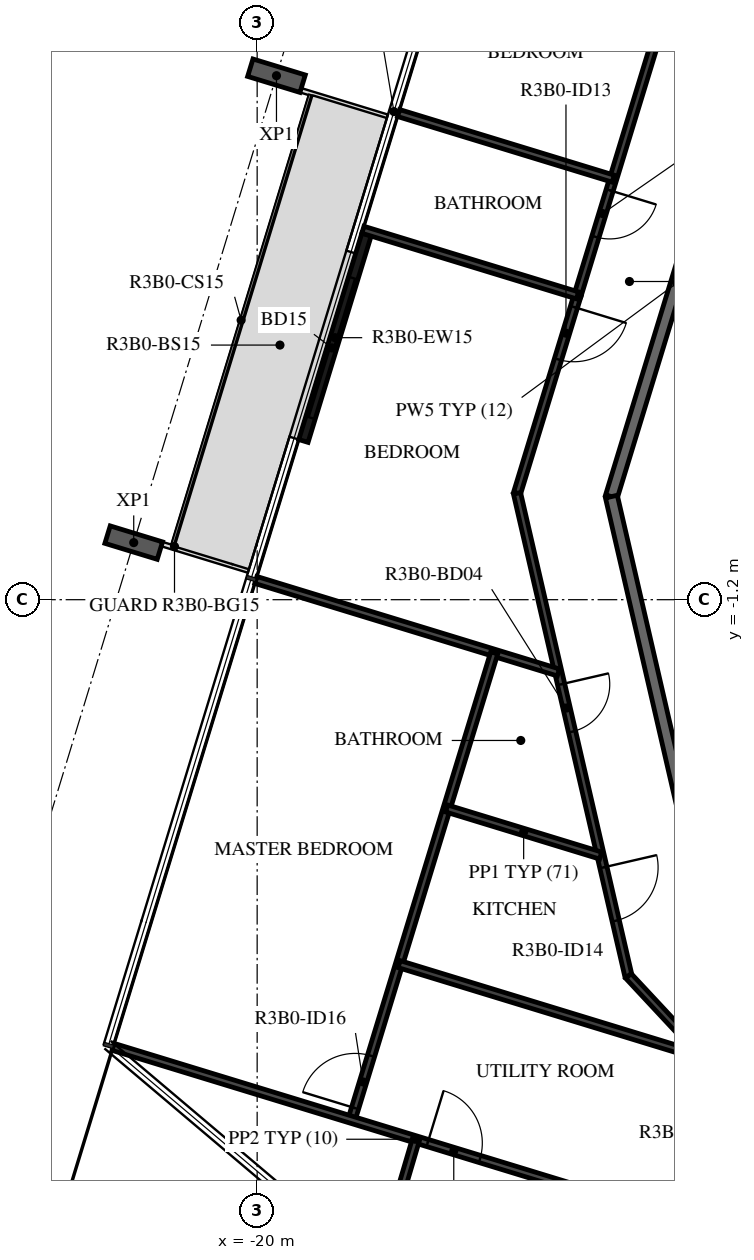
"""IFC4 building model, lengths in metres.
Left out: names, types, materials, properties, quantities, classifications, styles, units other than length and angle.
Written with IfcOpenShell. Run it as: python <this file> out.ifc"""

import sys

from ifc_helpers import new_model, si_unit, direction, frame, frame_2d, origin, origin_2d, place, context, subcontext, project, spatial, rectangle, i_section, extrude, element, fill, save


model = new_model("IFC4")
c1 = context("Model", 3, precision=1e-05, world=origin(), true_north=direction((0.0, 1.0)))
c2 = subcontext(c1, "Body", "Model", "MODEL_VIEW")
j1 = project(units=[si_unit("LENGTHUNIT", "METRE"), si_unit("PLANEANGLEUNIT", "RADIAN")], contexts=[c1])
p1 = place(None, origin())
s1 = spatial("IfcSite", under=j1, at=p1, CompositionType="ELEMENT")
p2 = place(p1, origin())
s2 = spatial("IfcBuilding", under=s1, at=p2, CompositionType="ELEMENT")
p3 = place(p2, frame((0.0, 0.0, 127.4)))
s3 = spatial("IfcBuildingStorey", under=s2, at=p3, CompositionType="ELEMENT", Elevation=127.4)
for number, where, z_axis, x_axis in (
    (1, (-19.682, 7.417, -0.38), (0.0, 0.0, 1.0), (0.292, 0.956, 0.0)),
    (2, (-22.03, -0.261, -0.38), (0.0, 0.0, 1.0), (0.292, 0.956, 0.0)),
):
    element("IfcColumn", number, at=place(p3, frame(where, z_axis=z_axis, x_axis=x_axis)), inside=s3, PredefinedType="COLUMN", context=c2, shape_type="SweptSolid", body=[
        extrude(i_section(OverallWidth=0.3, OverallDepth=0.9, WebThickness=0.019, FlangeThickness=0.035, FilletRadius=0.03, at=origin_2d()), origin(), (0.0, 0.0, 1.0), 3.5),
    ])
p4 = place(p3, frame((-18.201, 4.807, 0.0), z_axis=(0.0, 0.0, 1.0), x_axis=(-0.292356467713, -0.956309414252, 0.0)))
e3 = element("IfcWall", 3, at=p4, inside=s3, PredefinedType="STANDARD", context=c2, shape_type="SweptSolid", body=[
    extrude(rectangle(XDim=3.552, YDim=0.16, at=frame_2d((1.776, 0.0))), origin(), (0.0, 0.0, 1.0), 3.12),
])
p5 = place(p4, frame((0.752, 0.0, 0.0)))
e4 = element("IfcOpeningElement", 4, at=p5, cuts=e3, PredefinedType="OPENING", context=c2, shape_type="SweptSolid", body=[
    extrude(rectangle(XDim=2.4, YDim=2.4, at=frame_2d((1.2, 1.2))), frame((0.0, 0.09, 0.0), z_axis=(0.0, -1.0, 0.0), x_axis=(1.0, 0.0, 0.0)), (0.0, 0.0, 1.0), 0.18),
])
p6 = place(p3, frame((-12.028, 7.516, 0.0), z_axis=(0.0, 0.0, 1.0), x_axis=(-0.292365533182, -0.956306642771, 0.0)))
e5 = element("IfcWall", 5, at=p6, inside=s3, PredefinedType="STANDARD", context=c2, shape_type="SweptSolid", body=[
    extrude(rectangle(XDim=7.342, YDim=0.2, at=frame_2d((3.671, 0.0))), origin(), (0.0, 0.0, 1.0), 3.12),
])
p7 = place(p3, frame((-14.175, 0.495, 0.0), z_axis=(0.0, 0.0, 1.0), x_axis=(0.224922649383, -0.974376622151, 0.0)))
e6 = element("IfcWall", 6, at=p7, inside=s3, PredefinedType="STANDARD", context=c2, shape_type="SweptSolid", body=[
    extrude(rectangle(XDim=7.342, YDim=0.2, at=frame_2d((3.671, 0.0))), origin(), (0.0, 0.0, 1.0), 3.12),
])
p8 = place(p3, frame((-14.479, -13.504, 0.0), z_axis=(0.0, 0.0, 1.0), x_axis=(0.731329393611, 0.682024426278, 0.0)))
e7 = element("IfcWall", 7, at=p8, inside=s3, PredefinedType="STANDARD", context=c2, shape_type="SweptSolid", body=[
    extrude(rectangle(XDim=5.892, YDim=0.2, at=frame_2d((2.946, 0.0))), origin(), (0.0, 0.0, 1.0), 3.12),
])
p9 = place(p3, frame((-13.345, 8.339, 0.0), z_axis=(0.0, 0.0, 1.0), x_axis=(-0.292341490839, -0.956313992752, 0.0)))
e8 = element("IfcWall", 8, at=p9, inside=s3, PredefinedType="PARTITIONING", context=c2, shape_type="SweptSolid", body=[
    extrude(rectangle(XDim=4.742, YDim=0.12, at=frame_2d((2.371, 0.0))), origin(), (0.0, 0.0, 1.0), 3.12),
])
p10 = place(p9, frame((2.935, 0.0, 0.0)))
e9 = element("IfcOpeningElement", 9, at=p10, cuts=e8, PredefinedType="OPENING", context=c2, shape_type="SweptSolid", body=[
    extrude(rectangle(XDim=0.8, YDim=2.1, at=frame_2d((0.4, 1.05))), frame((0.0, 0.07, 0.0), z_axis=(0.0, -1.0, 0.0), x_axis=(1.0, 0.0, 0.0)), (0.0, 0.0, 1.0), 0.14),
])
p11 = place(p3, frame((-14.731, 3.804, 0.0), z_axis=(0.0, 0.0, 1.0), x_axis=(-0.292371609919, -0.956304784947, 0.0)))
e10 = element("IfcWall", 10, at=p11, inside=s3, PredefinedType="PARTITIONING", context=c2, shape_type="SweptSolid", body=[
    extrude(rectangle(XDim=3.404, YDim=0.12, at=frame_2d((1.702, 0.0))), origin(), (0.0, 0.0, 1.0), 3.12),
])
p12 = place(p11, frame((0.2, 0.0, 0.0)))
e11 = element("IfcOpeningElement", 11, at=p12, cuts=e10, PredefinedType="OPENING", context=c2, shape_type="SweptSolid", body=[
    extrude(rectangle(XDim=0.9, YDim=2.1, at=frame_2d((0.45, 1.05))), frame((0.0, 0.07, 0.0), z_axis=(0.0, -1.0, 0.0), x_axis=(1.0, 0.0, 0.0)), (0.0, 0.0, 1.0), 0.14),
])
p13 = place(p3, frame((-15.727, 0.549, 0.0), z_axis=(0.0, 0.0, 1.0), x_axis=(0.22493611855, -0.974373512864, 0.0)))
e12 = element("IfcWall", 12, at=p13, inside=s3, PredefinedType="PARTITIONING", context=c2, shape_type="SweptSolid", body=[
    extrude(rectangle(XDim=8.146, YDim=0.12, at=frame_2d((4.073, 0.0))), origin(), (0.0, 0.0, 1.0), 3.12),
])
p14 = place(p13, frame((3.223, 0.0, 0.0)))
e13 = element("IfcOpeningElement", 13, at=p14, cuts=e12, PredefinedType="OPENING", context=c2, shape_type="SweptSolid", body=[
    extrude(rectangle(XDim=0.8, YDim=2.1, at=frame_2d((0.4, 1.05))), frame((0.0, 0.07, 0.0), z_axis=(0.0, -1.0, 0.0), x_axis=(1.0, 0.0, 0.0)), (0.0, 0.0, 1.0), 0.14),
])
p15 = place(p13, frame((6.314, 0.0, 0.0)))
e14 = element("IfcOpeningElement", 14, at=p15, cuts=e12, PredefinedType="OPENING", context=c2, shape_type="SweptSolid", body=[
    extrude(rectangle(XDim=0.9, YDim=2.1, at=frame_2d((0.45, 1.05))), frame((0.0, 0.07, 0.0), z_axis=(0.0, -1.0, 0.0), x_axis=(1.0, 0.0, 0.0)), (0.0, 0.0, 1.0), 0.14),
])
p16 = place(p3, frame((-13.894, -7.388, 0.0), z_axis=(0.0, 0.0, 1.0), x_axis=(0.681978591143, -0.731372135935, 0.0)))
e15 = element("IfcWall", 15, at=p16, inside=s3, PredefinedType="PARTITIONING", context=c2, shape_type="SweptSolid", body=[
    extrude(rectangle(XDim=4.073, YDim=0.12, at=frame_2d((2.036, 0.0))), origin(), (0.0, 0.0, 1.0), 3.12),
])
p17 = place(p16, frame((2.033, 0.0, 0.0)))
e16 = element("IfcOpeningElement", 16, at=p17, cuts=e15, PredefinedType="OPENING", context=c2, shape_type="SweptSolid", body=[
    extrude(rectangle(XDim=0.9, YDim=2.1, at=frame_2d((0.45, 1.05))), frame((0.0, 0.07, 0.0), z_axis=(0.0, -1.0, 0.0), x_axis=(1.0, 0.0, 0.0)), (0.0, 0.0, 1.0), 0.14),
])
p18 = place(p3, frame((-17.674, 6.803, 0.0), z_axis=(0.0, 0.0, 1.0), x_axis=(0.956309456779, -0.292356328604, 0.0)))
e17 = element("IfcWall", 17, at=p18, inside=s3, PredefinedType="PARTITIONING", context=c2, shape_type="SweptSolid", body=[
    extrude(rectangle(XDim=3.691, YDim=0.12, at=frame_2d((1.846, 0.0))), origin(), (0.0, 0.0, 1.0), 2.73),
])
p19 = place(p3, frame((-14.731, 3.804, 0.0), z_axis=(0.0, 0.0, 1.0), x_axis=(-0.956303802771, 0.292374822456, 0.0)))
e18 = element("IfcWall", 18, at=p19, inside=s3, PredefinedType="PARTITIONING", context=c2, shape_type="SweptSolid", body=[
    extrude(rectangle(XDim=3.691, YDim=0.12, at=frame_2d((1.845, 0.0))), origin(), (0.0, 0.0, 1.0), 3.12),
])
p20 = place(p3, frame((-20.022, -0.875, 0.0), z_axis=(0.0, 0.0, 1.0), x_axis=(0.956311126457, -0.292350866963, 0.0)))
e19 = element("IfcWall", 19, at=p20, inside=s3, PredefinedType="PARTITIONING", context=c2, shape_type="SweptSolid", body=[
    extrude(rectangle(XDim=5.203, YDim=0.12, at=frame_2d((2.601, 0.0))), origin(), (0.0, 0.0, 1.0), 2.73),
])
p21 = place(p3, frame((-18.448, -9.752, 0.0), z_axis=(0.0, 0.0, 1.0), x_axis=(0.292365310779, 0.956306710764, 0.0)))
e20 = element("IfcWall", 20, at=p21, inside=s3, PredefinedType="PARTITIONING", context=c2, shape_type="SweptSolid", body=[
    extrude(rectangle(XDim=8.029, YDim=0.12, at=frame_2d((4.015, 0.0))), origin(), (0.0, 0.0, 1.0), 3.12),
])
p22 = place(p21, frame((0.2, 0.0, 0.0)))
e21 = element("IfcOpeningElement", 21, at=p22, cuts=e20, PredefinedType="OPENING", context=c2, shape_type="SweptSolid", body=[
    extrude(rectangle(XDim=0.9, YDim=2.1, at=frame_2d((0.45, 1.05))), frame((0.0, 0.07, 0.0), z_axis=(0.0, -1.0, 0.0), x_axis=(1.0, 0.0, 0.0)), (0.0, 0.0, 1.0), 0.14),
])
p23 = place(p3, frame((-22.369, -8.554, 0.0), z_axis=(0.0, 0.0, 1.0), x_axis=(0.956298667533, -0.292391618339, 0.0)))
e22 = element("IfcWall", 22, at=p23, inside=s3, PredefinedType="PARTITIONING", context=c2, shape_type="SweptSolid", body=[
    extrude(rectangle(XDim=10.392, YDim=0.12, at=frame_2d((5.196, 0.0))), origin(), (0.0, 0.0, 1.0), 2.73),
])
p24 = place(p23, frame((5.408, 0.0, 0.0)))
e23 = element("IfcOpeningElement", 23, at=p24, cuts=e22, PredefinedType="OPENING", context=c2, shape_type="SweptSolid", body=[
    extrude(rectangle(XDim=0.9, YDim=2.1, at=frame_2d((0.45, 1.05))), frame((0.0, 0.07, 0.0), z_axis=(0.0, -1.0, 0.0), x_axis=(1.0, 0.0, 0.0)), (0.0, 0.0, 1.0), 0.14),
])
p25 = place(p3, frame((-16.883, -4.634, 0.0), z_axis=(0.0, 0.0, 1.0), x_axis=(0.956297869455, -0.292394228526, 0.0)))
e24 = element("IfcWall", 24, at=p25, inside=s3, PredefinedType="PARTITIONING", context=c2, shape_type="SweptSolid", body=[
    extrude(rectangle(XDim=2.648, YDim=0.12, at=frame_2d((1.324, 0.0))), origin(), (0.0, 0.0, 1.0), 3.12),
])
p26 = place(p3, frame((-17.666, -7.193, 0.0), z_axis=(0.0, 0.0, 1.0), x_axis=(0.956299223218, -0.292389800905, 0.0)))
e25 = element("IfcWall", 25, at=p26, inside=s3, PredefinedType="PARTITIONING", context=c2, shape_type="SweptSolid", body=[
    extrude(rectangle(XDim=5.251, YDim=0.12, at=frame_2d((2.625, 0.0))), origin(), (0.0, 0.0, 1.0), 3.12),
])
p27 = place(p3, frame((-18.878, -15.115, 0.0), z_axis=(0.0, 0.0, 1.0), x_axis=(0.283491828289, 0.95897465206, 0.0)))
e26 = element("IfcWall", 26, at=p27, inside=s3, PredefinedType="PARTITIONING", context=c2, shape_type="SweptSolid", body=[
    extrude(rectangle(XDim=5.254, YDim=0.12, at=frame_2d((2.627, 0.0))), origin(), (0.0, 0.0, 1.0), 3.12),
])
p28 = place(p5, origin())
e27 = element("IfcDoor", 27, at=p28, inside=s3, OperationType="DOUBLE_DOOR_SLIDING", PredefinedType="DOOR", context=c2, shape_type="SweptSolid", body=[
    extrude(rectangle(XDim=2.4, YDim=2.4, at=frame_2d((1.2, 1.2))), frame((0.0, 0.025, 0.0), z_axis=(0.0, -1.0, 0.0), x_axis=(1.0, 0.0, 0.0)), (0.0, 0.0, 1.0), 0.05),
])
fill(e4, e27)
p29 = place(p12, origin())
e28 = element("IfcDoor", 28, at=p29, inside=s3, OperationType="SINGLE_SWING_RIGHT", PredefinedType="DOOR", context=c2, shape_type="SweptSolid", body=[
    extrude(rectangle(XDim=0.9, YDim=2.1, at=frame_2d((0.45, 1.05))), frame((0.0, 0.025, 0.0), z_axis=(0.0, -1.0, 0.0), x_axis=(1.0, 0.0, 0.0)), (0.0, 0.0, 1.0), 0.05),
])
fill(e11, e28)
p30 = place(p10, origin())
e29 = element("IfcDoor", 29, at=p30, inside=s3, OperationType="SINGLE_SWING_LEFT", PredefinedType="DOOR", context=c2, shape_type="SweptSolid", body=[
    extrude(rectangle(XDim=0.8, YDim=2.1, at=frame_2d((0.4, 1.05))), frame((0.0, 0.025, 0.0), z_axis=(0.0, -1.0, 0.0), x_axis=(1.0, 0.0, 0.0)), (0.0, 0.0, 1.0), 0.05),
])
fill(e9, e29)
p31 = place(p14, origin())
e30 = element("IfcDoor", 30, at=p31, inside=s3, OperationType="SINGLE_SWING_RIGHT", PredefinedType="DOOR", context=c2, shape_type="SweptSolid", body=[
    extrude(rectangle(XDim=0.8, YDim=2.1, at=frame_2d((0.4, 1.05))), frame((0.0, 0.025, 0.0), z_axis=(0.0, -1.0, 0.0), x_axis=(1.0, 0.0, 0.0)), (0.0, 0.0, 1.0), 0.05),
])
fill(e13, e30)
p32 = place(p15, origin())
e31 = element("IfcDoor", 31, at=p32, inside=s3, OperationType="SINGLE_SWING_RIGHT", PredefinedType="DOOR", context=c2, shape_type="SweptSolid", body=[
    extrude(rectangle(XDim=0.9, YDim=2.1, at=frame_2d((0.45, 1.05))), frame((0.0, 0.025, 0.0), z_axis=(0.0, -1.0, 0.0), x_axis=(1.0, 0.0, 0.0)), (0.0, 0.0, 1.0), 0.05),
])
fill(e14, e31)
p33 = place(p22, origin())
e32 = element("IfcDoor", 32, at=p33, inside=s3, OperationType="SINGLE_SWING_RIGHT", PredefinedType="DOOR", context=c2, shape_type="SweptSolid", body=[
    extrude(rectangle(XDim=0.9, YDim=2.1, at=frame_2d((0.45, 1.05))), frame((0.0, 0.025, 0.0), z_axis=(0.0, -1.0, 0.0), x_axis=(1.0, 0.0, 0.0)), (0.0, 0.0, 1.0), 0.05),
])
fill(e21, e32)
p34 = place(p24, origin())
e33 = element("IfcDoor", 33, at=p34, inside=s3, OperationType="SINGLE_SWING_RIGHT", PredefinedType="DOOR", context=c2, shape_type="SweptSolid", body=[
    extrude(rectangle(XDim=0.9, YDim=2.1, at=frame_2d((0.45, 1.05))), frame((0.0, 0.025, 0.0), z_axis=(0.0, -1.0, 0.0), x_axis=(1.0, 0.0, 0.0)), (0.0, 0.0, 1.0), 0.05),
])
fill(e23, e33)
save(model, sys.argv[1])
